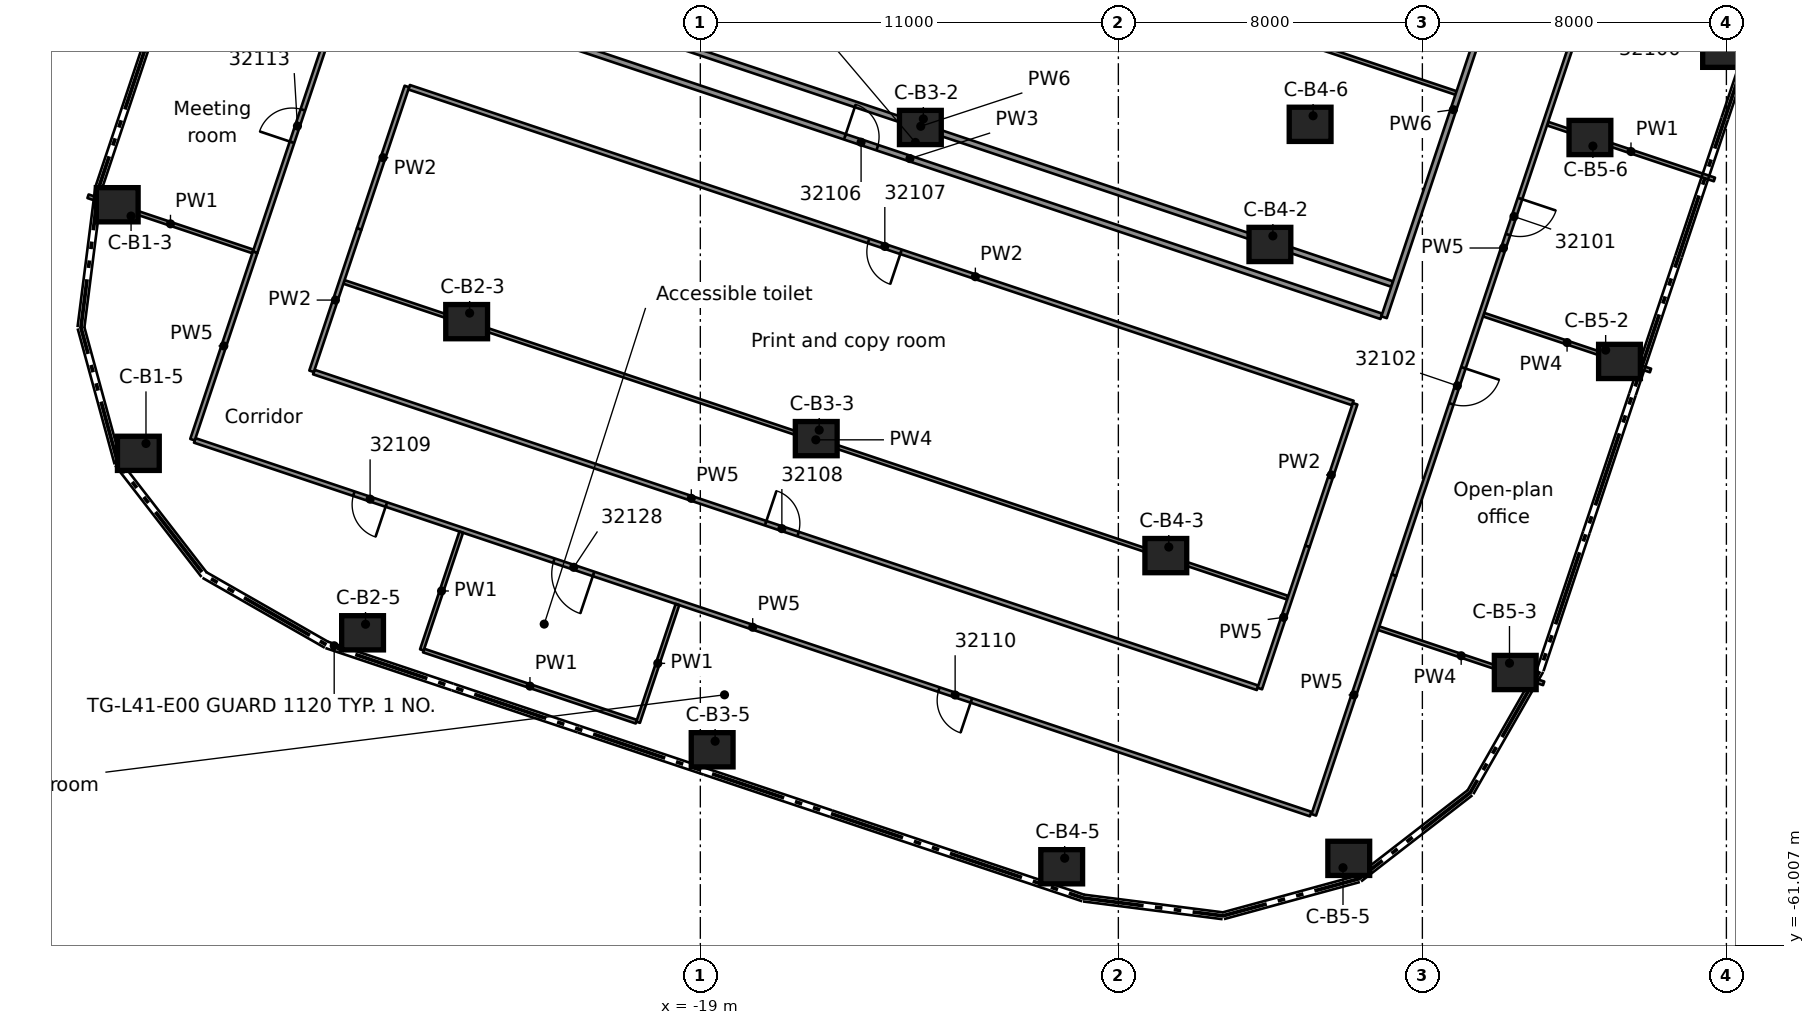
"""IFC4 building model, lengths in metres.
Left out: names, types, materials, properties, quantities, classifications, styles, units other than length and angle.
Written with IfcOpenShell. Run it as: python <this file> out.ifc"""

import sys

from ifc_helpers import new_model, si_unit, direction, frame, frame_2d, origin, origin_2d, place, context, subcontext, project, spatial, rectangle, extrude, element, fill, save


model = new_model("IFC4")
c1 = context("Model", 3, precision=1e-05, world=origin(), true_north=direction((0.0, 1.0)))
c2 = subcontext(c1, "Body", "Model", "MODEL_VIEW")
j1 = project(units=[si_unit("LENGTHUNIT", "METRE"), si_unit("PLANEANGLEUNIT", "RADIAN")], contexts=[c1])
p1 = place(None, origin())
s1 = spatial("IfcSite", under=j1, at=p1, CompositionType="ELEMENT")
p2 = place(p1, origin())
s2 = spatial("IfcBuilding", under=s1, at=p2, CompositionType="ELEMENT")
p3 = place(p2, frame((0.0, 0.0, 159.6)))
s3 = spatial("IfcBuildingStorey", under=s2, at=p3, CompositionType="ELEMENT", Elevation=159.6)
for number, where, z_axis, x_axis in (
    (1, (-34.344, -41.515, 0.0), (0.0, 0.0, 1.0), (1.0, 0.0, 0.0)),
    (2, (-33.788, -48.056, 0.0), (0.0, 0.0, 1.0), (1.0, 0.0, 0.0)),
    (3, (-25.149, -44.591, 0.0), (0.0, 0.0, 1.0), (1.0, 0.0, 0.0)),
    (4, (-27.888, -52.778, 0.0), (0.0, 0.0, 1.0), (1.0, 0.0, 0.0)),
    (5, (-13.21, -39.482, 0.0), (0.0, 0.0, 1.0), (1.0, 0.0, 0.0)),
    (6, (-15.95, -47.669, 0.0), (0.0, 0.0, 1.0), (1.0, 0.0, 0.0)),
    (7, (-18.689, -55.856, 0.0), (0.0, 0.0, 1.0), (1.0, 0.0, 0.0)),
    (8, (-4.012, -42.56, 0.0), (0.0, 0.0, 1.0), (1.0, 0.0, 0.0)),
    (9, (-6.751, -50.747, 0.0), (0.0, 0.0, 1.0), (1.0, 0.0, 0.0)),
    (10, (-9.491, -58.934, 0.0), (0.0, 0.0, 1.0), (1.0, 0.0, 0.0)),
    (11, (-2.954, -39.399, 0.0), (0.0, 0.0, 1.0), (1.0, 0.0, 0.0)),
    (12, (7.926, -37.45, 0.0), (0.0, 0.0, 1.0), (1.0, 0.0, 0.0)),
    (13, (5.187, -45.638, 0.0), (0.0, 0.0, 1.0), (1.0, 0.0, 0.0)),
    (14, (2.444, -53.823, 0.0), (0.0, 0.0, 1.0), (1.0, 0.0, 0.0)),
    (15, (-1.937, -58.713, 0.0), (0.0, 0.0, 1.0), (1.0, 0.0, 0.0)),
    (16, (4.409, -39.746, 0.0), (0.0, 0.0, 1.0), (1.0, 0.0, 0.0)),
):
    element("IfcColumn", number, at=place(p3, frame(where, z_axis=z_axis, x_axis=x_axis)), inside=s3, PredefinedType="COLUMN", context=c2, shape_type="SweptSolid", body=[
        extrude(rectangle(XDim=1.1, YDim=0.9, at=origin_2d()), origin(), (0.0, 0.0, 1.0), 3.5),
    ])
p4 = place(p3, frame((-26.281, -53.245, 0.0), z_axis=(0.0, 0.0, 1.0), x_axis=(0.948351779966, -0.317220587976, 0.0)))
e17 = element("IfcWall", 17, at=p4, inside=s3, PredefinedType="PARTITIONING", context=c2, shape_type="SweptSolid", body=[
    extrude(rectangle(XDim=5.901, YDim=0.1, at=frame_2d((2.95, 0.0))), origin(), (0.0, 0.0, 1.0), 3.08),
])
p5 = place(p3, frame((-2.94, -57.547, 0.0), z_axis=(0.0, 0.0, 1.0), x_axis=(-0.948265401731, 0.317478704609, 0.0)))
e18 = element("IfcWall", 18, at=p5, inside=s3, PredefinedType="PARTITIONING", context=c2, shape_type="SweptSolid", body=[
    extrude(rectangle(XDim=30.966, YDim=0.125, at=frame_2d((15.483, 0.0))), origin(), (0.0, 0.0, 1.0), 2.445),
])
p6 = place(p5, frame((25.65, 0.0, 0.0)))
e19 = element("IfcOpeningElement", 19, at=p6, cuts=e18, PredefinedType="OPENING", context=c2, shape_type="SweptSolid", body=[
    extrude(rectangle(XDim=0.9, YDim=2.1, at=frame_2d((0.45, 1.05))), frame((0.0, 0.073, 0.0), z_axis=(0.0, -1.0, 0.0), x_axis=(1.0, 0.0, 0.0)), (0.0, 0.0, 1.0), 0.145),
])
p7 = place(p5, frame((9.415, 0.0, 0.0)))
e20 = element("IfcOpeningElement", 20, at=p7, cuts=e18, PredefinedType="OPENING", context=c2, shape_type="SweptSolid", body=[
    extrude(rectangle(XDim=0.9, YDim=2.1, at=frame_2d((0.45, 1.05))), frame((0.0, 0.073, 0.0), z_axis=(0.0, -1.0, 0.0), x_axis=(1.0, 0.0, 0.0)), (0.0, 0.0, 1.0), 0.145),
])
p8 = place(p5, frame((19.9, 0.0, 0.0)))
e21 = element("IfcOpeningElement", 21, at=p8, cuts=e18, PredefinedType="OPENING", context=c2, shape_type="SweptSolid", body=[
    extrude(rectangle(XDim=1.1, YDim=2.1, at=frame_2d((0.55, 1.05))), frame((0.0, 0.073, 0.0), z_axis=(0.0, -1.0, 0.0), x_axis=(1.0, 0.0, 0.0)), (0.0, 0.0, 1.0), 0.145),
])
p9 = place(p3, frame((-29.171, -45.917, 0.0), z_axis=(0.0, 0.0, 1.0), x_axis=(0.948337781815, -0.317262433299, 0.0)))
e22 = element("IfcWall", 22, at=p9, inside=s3, PredefinedType="PARTITIONING", context=c2, shape_type="SweptSolid", body=[
    extrude(rectangle(XDim=26.187, YDim=0.125, at=frame_2d((13.093, 0.0))), origin(), (0.0, 0.0, 1.0), 2.445),
])
p10 = place(p9, frame((12.538, 0.0, 0.0)))
e23 = element("IfcOpeningElement", 23, at=p10, cuts=e22, PredefinedType="OPENING", context=c2, shape_type="SweptSolid", body=[
    extrude(rectangle(XDim=0.9, YDim=2.1, at=frame_2d((0.45, 1.05))), frame((0.0, 0.073, 0.0), z_axis=(0.0, -1.0, 0.0), x_axis=(1.0, 0.0, 0.0)), (0.0, 0.0, 1.0), 0.145),
])
p11 = place(p3, frame((-35.112, -41.292, 0.0), z_axis=(0.0, 0.0, 1.0), x_axis=(0.94831984375, -0.317316047419, 0.0)))
e24 = element("IfcWall", 24, at=p11, inside=s3, PredefinedType="PARTITIONING", context=c2, shape_type="SweptSolid", body=[
    extrude(rectangle(XDim=4.576, YDim=0.1, at=frame_2d((2.288, 0.0))), origin(), (0.0, 0.0, 1.0), 3.08),
])
p12 = place(p3, frame((-28.378, -43.546, 0.0), z_axis=(0.0, 0.0, 1.0), x_axis=(0.948326561211, -0.317295971139, 0.0)))
e25 = element("IfcWall", 25, at=p12, inside=s3, PredefinedType="PARTITIONING", context=c2, shape_type="SweptSolid", body=[
    extrude(rectangle(XDim=26.187, YDim=0.1, at=frame_2d((13.094, 0.0))), origin(), (0.0, 0.0, 1.0), 2.445),
])
p13 = place(p3, frame((-1.149, -52.657, 0.0), z_axis=(0.0, 0.0, 1.0), x_axis=(0.948400148701, -0.317075949805, 0.0)))
e26 = element("IfcWall", 26, at=p13, inside=s3, PredefinedType="PARTITIONING", context=c2, shape_type="SweptSolid", body=[
    extrude(rectangle(XDim=4.576, YDim=0.1, at=frame_2d((2.288, 0.0))), origin(), (0.0, 0.0, 1.0), 2.445),
])
p14 = place(p3, frame((-1.829, -46.732, 0.0), z_axis=(0.0, 0.0, 1.0), x_axis=(-0.948329366448, 0.317287586791, 0.0)))
e27 = element("IfcWall", 27, at=p14, inside=s3, PredefinedType="PARTITIONING", context=c2, shape_type="SweptSolid", body=[
    extrude(rectangle(XDim=26.187, YDim=0.125, at=frame_2d((13.094, 0.0))), origin(), (0.0, 0.0, 1.0), 3.08),
])
p15 = place(p14, frame((12.538, 0.0, 0.0)))
e28 = element("IfcOpeningElement", 28, at=p15, cuts=e27, PredefinedType="OPENING", context=c2, shape_type="SweptSolid", body=[
    extrude(rectangle(XDim=0.9, YDim=2.1, at=frame_2d((0.45, 1.05))), frame((0.0, 0.073, 0.0), z_axis=(0.0, -1.0, 0.0), x_axis=(1.0, 0.0, 0.0)), (0.0, 0.0, 1.0), 0.145),
])
p16 = place(p3, frame((-25.889, -36.15, 0.0), z_axis=(0.0, 0.0, 1.0), x_axis=(0.94832621322, -0.317297011205, 0.0)))
e29 = element("IfcWall", 29, at=p16, inside=s3, PredefinedType="PARTITIONING", context=c2, shape_type="SweptSolid", body=[
    extrude(rectangle(XDim=26.162, YDim=0.15, at=frame_2d((13.081, 0.0))), origin(), (0.0, 0.0, 1.0), 3.08),
])
p17 = place(p16, frame((11.275, 0.0, 0.0)))
e30 = element("IfcOpeningElement", 30, at=p17, cuts=e29, PredefinedType="OPENING", context=c2, shape_type="SweptSolid", body=[
    extrude(rectangle(XDim=0.9, YDim=2.1, at=frame_2d((0.45, 1.05))), frame((0.0, 0.085, 0.0), z_axis=(0.0, -1.0, 0.0), x_axis=(1.0, 0.0, 0.0)), (0.0, 0.0, 1.0), 0.17),
])
p18 = place(p3, frame((-25.605, -35.3, 0.0), z_axis=(0.0, 0.0, 1.0), x_axis=(0.948327152728, -0.317294203223, 0.0)))
e31 = element("IfcWall", 31, at=p18, inside=s3, PredefinedType="PARTITIONING", context=c2, shape_type="SweptSolid", body=[
    extrude(rectangle(XDim=26.162, YDim=0.15, at=frame_2d((13.081, 0.0))), origin(), (0.0, 0.0, 1.0), 2.445),
])
p19 = place(p3, frame((1.612, -44.407, 0.0), z_axis=(0.0, 0.0, 1.0), x_axis=(0.948334710824, -0.317271612734, 0.0)))
e32 = element("IfcWall", 32, at=p19, inside=s3, PredefinedType="PARTITIONING", context=c2, shape_type="SweptSolid", body=[
    extrude(rectangle(XDim=4.63, YDim=0.1, at=frame_2d((2.315, 0.0))), origin(), (0.0, 0.0, 1.0), 2.445),
])
p20 = place(p3, frame((-23.935, -30.27, 0.0), z_axis=(0.0, 0.0, 1.0), x_axis=(0.948328260126, -0.317290893418, 0.0)))
e33 = element("IfcWall", 33, at=p20, inside=s3, PredefinedType="PARTITIONING", context=c2, shape_type="SweptSolid", body=[
    extrude(rectangle(XDim=26.175, YDim=0.1, at=frame_2d((13.087, 0.0))), origin(), (0.0, 0.0, 1.0), 3.08),
])
p21 = place(p3, frame((3.294, -39.38, 0.0), z_axis=(0.0, 0.0, 1.0), x_axis=(0.948260676976, -0.317492816455, 0.0)))
e34 = element("IfcWall", 34, at=p21, inside=s3, PredefinedType="PARTITIONING", context=c2, shape_type="SweptSolid", body=[
    extrude(rectangle(XDim=4.631, YDim=0.1, at=frame_2d((2.315, 0.0))), origin(), (0.0, 0.0, 1.0), 3.08),
])
p22 = place(p3, frame((-2.858, -57.568, 0.0), z_axis=(0.0, 0.0, 1.0), x_axis=(0.317328623894, 0.94831563546, 0.0)))
e35 = element("IfcWall", 35, at=p22, inside=s3, PredefinedType="PARTITIONING", context=c2, shape_type="SweptSolid", body=[
    extrude(rectangle(XDim=6.652, YDim=0.125, at=frame_2d((3.326, 0.0))), origin(), (0.0, 0.0, 1.0), 2.445),
])
p23 = place(p3, frame((5.014, -34.047, 0.0), z_axis=(0.0, 0.0, 1.0), x_axis=(-0.317385597106, -0.948296568986, 0.0)))
e36 = element("IfcWall", 36, at=p23, inside=s3, PredefinedType="PARTITIONING", context=c2, shape_type="SweptSolid", body=[
    extrude(rectangle(XDim=18.151, YDim=0.125, at=frame_2d((9.076, 0.0))), origin(), (0.0, 0.0, 1.0), 2.445),
])
p24 = place(p23, frame((2.347, 0.0, 0.0)))
e37 = element("IfcOpeningElement", 37, at=p24, cuts=e36, PredefinedType="OPENING", context=c2, shape_type="SweptSolid", body=[
    extrude(rectangle(XDim=1.0, YDim=2.1, at=frame_2d((0.5, 1.05))), frame((0.0, 0.073, 0.0), z_axis=(0.0, -1.0, 0.0), x_axis=(1.0, 0.0, 0.0)), (0.0, 0.0, 1.0), 0.145),
])
p25 = place(p23, frame((7.703, 0.0, 0.0)))
e38 = element("IfcOpeningElement", 38, at=p25, cuts=e36, PredefinedType="OPENING", context=c2, shape_type="SweptSolid", body=[
    extrude(rectangle(XDim=1.0, YDim=2.1, at=frame_2d((0.5, 1.05))), frame((0.0, 0.073, 0.0), z_axis=(0.0, -1.0, 0.0), x_axis=(1.0, 0.0, 0.0)), (0.0, 0.0, 1.0), 0.145),
])
p26 = place(p23, frame((12.399, 0.0, 0.0)))
e39 = element("IfcOpeningElement", 39, at=p26, cuts=e36, PredefinedType="OPENING", context=c2, shape_type="SweptSolid", body=[
    extrude(rectangle(XDim=1.0, YDim=2.1, at=frame_2d((0.5, 1.05))), frame((0.0, 0.073, 0.0), z_axis=(0.0, -1.0, 0.0), x_axis=(1.0, 0.0, 0.0)), (0.0, 0.0, 1.0), 0.145),
])
p27 = place(p3, frame((-3.024, -50.499, 0.0), z_axis=(0.0, 0.0, 1.0), x_axis=(-0.317469687011, -0.94826842077, 0.0)))
e40 = element("IfcWall", 40, at=p27, inside=s3, PredefinedType="PARTITIONING", context=c2, shape_type="SweptSolid", body=[
    extrude(rectangle(XDim=3.95, YDim=0.125, at=frame_2d((1.975, 0.0))), origin(), (0.0, 0.0, 1.0), 2.445),
])
p28 = place(p3, frame((-3.024, -50.499, 0.0), z_axis=(0.0, 0.0, 1.0), x_axis=(0.317339720629, 0.94831192216, 0.0)))
e41 = element("IfcWall", 41, at=p28, inside=s3, PredefinedType="PARTITIONING", context=c2, shape_type="SweptSolid", body=[
    extrude(rectangle(XDim=3.951, YDim=0.125, at=frame_2d((1.976, 0.0))), origin(), (0.0, 0.0, 1.0), 3.08),
])
p29 = place(p3, frame((-1.008, -44.475, 0.0), z_axis=(0.0, 0.0, 1.0), x_axis=(0.316889155775, 0.948462578572, 0.0)))
e42 = element("IfcWall", 42, at=p29, inside=s3, PredefinedType="PARTITIONING", context=c2, shape_type="SweptSolid", body=[
    extrude(rectangle(XDim=11.516, YDim=0.15, at=frame_2d((5.758, 0.0))), origin(), (0.0, 0.0, 1.0), 2.445),
])
p30 = place(p29, frame((8.296, 0.0, 0.0)))
e43 = element("IfcOpeningElement", 43, at=p30, cuts=e42, PredefinedType="OPENING", context=c2, shape_type="SweptSolid", body=[
    extrude(rectangle(XDim=0.9, YDim=2.1, at=frame_2d((0.45, 1.05))), frame((0.0, 0.085, 0.0), z_axis=(0.0, -1.0, 0.0), x_axis=(1.0, 0.0, 0.0)), (0.0, 0.0, 1.0), 0.17),
])
p31 = place(p3, frame((-20.637, -55.132, 0.0), z_axis=(0.0, 0.0, 1.0), x_axis=(0.316922325985, 0.948451495487, 0.0)))
e44 = element("IfcWall", 44, at=p31, inside=s3, PredefinedType="PARTITIONING", context=c2, shape_type="SweptSolid", body=[
    extrude(rectangle(XDim=3.269, YDim=0.1, at=frame_2d((1.634, 0.0))), origin(), (0.0, 0.0, 1.0), 3.08),
])
p32 = place(p3, frame((-26.328, -53.228, 0.0), z_axis=(0.0, 0.0, 1.0), x_axis=(0.317191051156, 0.948361659425, 0.0)))
e45 = element("IfcWall", 45, at=p32, inside=s3, PredefinedType="PARTITIONING", context=c2, shape_type="SweptSolid", body=[
    extrude(rectangle(XDim=3.269, YDim=0.1, at=frame_2d((1.634, 0.0))), origin(), (0.0, 0.0, 1.0), 3.08),
])
p33 = place(p3, frame((-27.976, -42.15, 0.0), z_axis=(0.0, 0.0, 1.0), x_axis=(-0.317339720629, -0.94831192216, 0.0)))
e46 = element("IfcWall", 46, at=p33, inside=s3, PredefinedType="PARTITIONING", context=c2, shape_type="SweptSolid", body=[
    extrude(rectangle(XDim=3.951, YDim=0.125, at=frame_2d((1.976, 0.0))), origin(), (0.0, 0.0, 1.0), 3.08),
])
p34 = place(p3, frame((-27.976, -42.15, 0.0), z_axis=(0.0, 0.0, 1.0), x_axis=(0.317413881712, 0.948287101935, 0.0)))
e47 = element("IfcWall", 47, at=p34, inside=s3, PredefinedType="PARTITIONING", context=c2, shape_type="SweptSolid", body=[
    extrude(rectangle(XDim=3.951, YDim=0.125, at=frame_2d((1.976, 0.0))), origin(), (0.0, 0.0, 1.0), 3.08),
])
p35 = place(p3, frame((-30.714, -42.764, 0.0), z_axis=(0.0, 0.0, 1.0), x_axis=(0.317699123241, 0.94819157721, 0.0)))
e48 = element("IfcWall", 48, at=p35, inside=s3, PredefinedType="PARTITIONING", context=c2, shape_type="SweptSolid", body=[
    extrude(rectangle(XDim=19.906, YDim=0.125, at=frame_2d((9.953, 0.0))), origin(), (0.0, 0.0, 1.0), 3.08),
])
p36 = place(p35, frame((16.35, 0.0, 0.0)))
e49 = element("IfcOpeningElement", 49, at=p36, cuts=e48, PredefinedType="OPENING", context=c2, shape_type="SweptSolid", body=[
    extrude(rectangle(XDim=0.9, YDim=2.1, at=frame_2d((0.45, 1.05))), frame((0.0, 0.073, 0.0), z_axis=(0.0, -1.0, 0.0), x_axis=(1.0, 0.0, 0.0)), (0.0, 0.0, 1.0), 0.145),
])
p37 = place(p35, frame((10.8, 0.0, 0.0)))
e50 = element("IfcOpeningElement", 50, at=p37, cuts=e48, PredefinedType="OPENING", context=c2, shape_type="SweptSolid", body=[
    extrude(rectangle(XDim=0.9, YDim=2.1, at=frame_2d((0.45, 1.05))), frame((0.0, 0.073, 0.0), z_axis=(0.0, -1.0, 0.0), x_axis=(1.0, 0.0, 0.0)), (0.0, 0.0, 1.0), 0.145),
])
p38 = place(p35, frame((3.051, 0.0, 0.0)))
e51 = element("IfcOpeningElement", 51, at=p38, cuts=e48, PredefinedType="OPENING", context=c2, shape_type="SweptSolid", body=[
    extrude(rectangle(XDim=0.9, YDim=2.1, at=frame_2d((0.45, 1.05))), frame((0.0, 0.073, 0.0), z_axis=(0.0, -1.0, 0.0), x_axis=(1.0, 0.0, 0.0)), (0.0, 0.0, 1.0), 0.145),
])
p39 = place(p3, frame((-30.715, -42.765, 0.0), z_axis=(0.0, 0.0, 1.0), x_axis=(-0.31696020199, -0.948438838489, 0.0)))
e52 = element("IfcWall", 52, at=p39, inside=s3, PredefinedType="PARTITIONING", context=c2, shape_type="SweptSolid", body=[
    extrude(rectangle(XDim=5.199, YDim=0.125, at=frame_2d((2.6, 0.0))), origin(), (0.0, 0.0, 1.0), 2.445),
])
p40 = place(p25, origin())
e53 = element("IfcDoor", 53, at=p40, inside=s3, OperationType="SINGLE_SWING_LEFT", PredefinedType="DOOR", context=c2, shape_type="SweptSolid", body=[
    extrude(rectangle(XDim=1.0, YDim=2.1, at=frame_2d((0.5, 1.05))), frame((0.0, 0.025, 0.0), z_axis=(0.0, -1.0, 0.0), x_axis=(1.0, 0.0, 0.0)), (0.0, 0.0, 1.0), 0.05),
])
fill(e38, e53)
p41 = place(p26, origin())
e54 = element("IfcDoor", 54, at=p41, inside=s3, OperationType="SINGLE_SWING_RIGHT", PredefinedType="DOOR", context=c2, shape_type="SweptSolid", body=[
    extrude(rectangle(XDim=1.0, YDim=2.1, at=frame_2d((0.5, 1.05))), frame((0.0, 0.025, 0.0), z_axis=(0.0, -1.0, 0.0), x_axis=(1.0, 0.0, 0.0)), (0.0, 0.0, 1.0), 0.05),
])
fill(e39, e54)
p42 = place(p17, origin())
e55 = element("IfcDoor", 55, at=p42, inside=s3, OperationType="SINGLE_SWING_LEFT", PredefinedType="DOOR", context=c2, shape_type="SweptSolid", body=[
    extrude(rectangle(XDim=0.9, YDim=2.1, at=frame_2d((0.45, 1.05))), frame((0.0, 0.025, 0.0), z_axis=(0.0, -1.0, 0.0), x_axis=(1.0, 0.0, 0.0)), (0.0, 0.0, 1.0), 0.05),
])
fill(e30, e55)
p43 = place(p15, origin())
e56 = element("IfcDoor", 56, at=p43, inside=s3, OperationType="SINGLE_SWING_LEFT", PredefinedType="DOOR", context=c2, shape_type="SweptSolid", body=[
    extrude(rectangle(XDim=0.9, YDim=2.1, at=frame_2d((0.45, 1.05))), frame((0.0, 0.025, 0.0), z_axis=(0.0, -1.0, 0.0), x_axis=(1.0, 0.0, 0.0)), (0.0, 0.0, 1.0), 0.05),
])
fill(e28, e56)
p44 = place(p10, origin())
e57 = element("IfcDoor", 57, at=p44, inside=s3, OperationType="SINGLE_SWING_LEFT", PredefinedType="DOOR", context=c2, shape_type="SweptSolid", body=[
    extrude(rectangle(XDim=0.9, YDim=2.1, at=frame_2d((0.45, 1.05))), frame((0.0, 0.025, 0.0), z_axis=(0.0, -1.0, 0.0), x_axis=(1.0, 0.0, 0.0)), (0.0, 0.0, 1.0), 0.05),
])
fill(e23, e57)
p45 = place(p6, origin())
e58 = element("IfcDoor", 58, at=p45, inside=s3, OperationType="SINGLE_SWING_RIGHT", PredefinedType="DOOR", context=c2, shape_type="SweptSolid", body=[
    extrude(rectangle(XDim=0.9, YDim=2.1, at=frame_2d((0.45, 1.05))), frame((0.0, 0.025, 0.0), z_axis=(0.0, -1.0, 0.0), x_axis=(1.0, 0.0, 0.0)), (0.0, 0.0, 1.0), 0.05),
])
fill(e19, e58)
p46 = place(p7, origin())
e59 = element("IfcDoor", 59, at=p46, inside=s3, OperationType="SINGLE_SWING_LEFT", PredefinedType="DOOR", context=c2, shape_type="SweptSolid", body=[
    extrude(rectangle(XDim=0.9, YDim=2.1, at=frame_2d((0.45, 1.05))), frame((0.0, 0.025, 0.0), z_axis=(0.0, -1.0, 0.0), x_axis=(1.0, 0.0, 0.0)), (0.0, 0.0, 1.0), 0.05),
])
fill(e20, e59)
p47 = place(p38, origin())
e60 = element("IfcDoor", 60, at=p47, inside=s3, OperationType="SINGLE_SWING_LEFT", PredefinedType="DOOR", context=c2, shape_type="SweptSolid", body=[
    extrude(rectangle(XDim=0.9, YDim=2.1, at=frame_2d((0.45, 1.05))), frame((0.0, 0.025, 0.0), z_axis=(0.0, -1.0, 0.0), x_axis=(1.0, 0.0, 0.0)), (0.0, 0.0, 1.0), 0.05),
])
fill(e51, e60)
p48 = place(p8, origin())
e61 = element("IfcDoor", 61, at=p48, inside=s3, OperationType="SINGLE_SWING_RIGHT", PredefinedType="DOOR", context=c2, shape_type="SweptSolid", body=[
    extrude(rectangle(XDim=1.1, YDim=2.1, at=frame_2d((0.55, 1.05))), frame((0.0, 0.025, 0.0), z_axis=(0.0, -1.0, 0.0), x_axis=(1.0, 0.0, 0.0)), (0.0, 0.0, 1.0), 0.05),
])
fill(e21, e61)
save(model, sys.argv[1])
